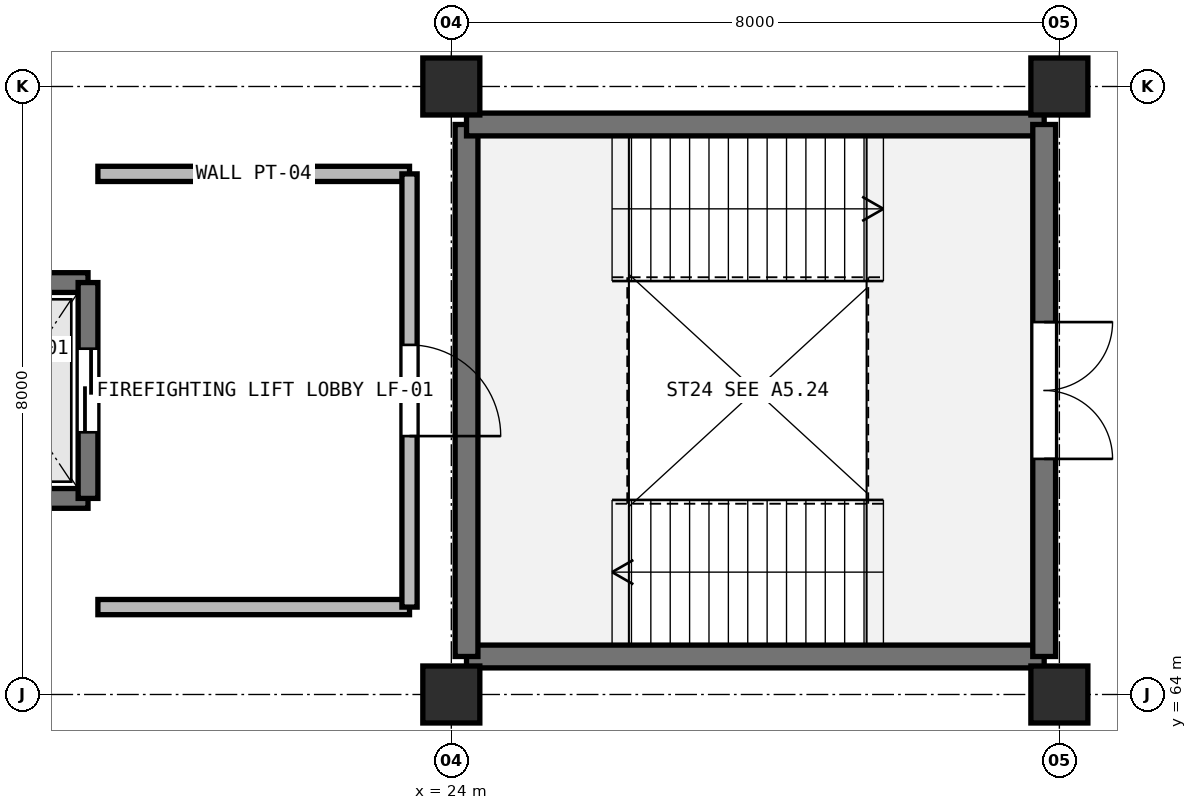
"""IFC4 building model, lengths in metres.
Left out: names, types, materials, properties, quantities, classifications, styles, units other than length and angle.
Written with IfcOpenShell. Run it as: python <this file> out.ifc"""

import sys

from ifc_helpers import new_model, si_unit, direction, frame, frame_2d, origin, origin_2d, place, context, subcontext, project, spatial, rectangle, extrude, element, fill, save


model = new_model("IFC4")
c1 = context("Model", 3, precision=1e-05, world=origin(), true_north=direction((0.0, 1.0)))
c2 = subcontext(c1, "Body", "Model", "MODEL_VIEW")
j1 = project(units=[si_unit("LENGTHUNIT", "METRE"), si_unit("PLANEANGLEUNIT", "RADIAN")], contexts=[c1])
p1 = place(None, origin())
s1 = spatial("IfcSite", under=j1, at=p1, CompositionType="ELEMENT")
p2 = place(p1, origin())
s2 = spatial("IfcBuilding", under=s1, at=p2, CompositionType="ELEMENT")
p3 = place(p2, origin())
s3 = spatial("IfcBuildingStorey", under=s2, at=p3, CompositionType="ELEMENT", Elevation=0.0)
for number, where, z_axis, x_axis in (
    (1, (24.0, 64.0, 0.0), (0.0, 0.0, 1.0), (1.0, 0.0, 0.0)),
    (2, (24.0, 72.0, 0.0), (0.0, 0.0, 1.0), (1.0, 0.0, 0.0)),
    (3, (32.0, 64.0, 0.0), (0.0, 0.0, 1.0), (1.0, 0.0, 0.0)),
    (4, (32.0, 72.0, 0.0), (0.0, 0.0, 1.0), (1.0, 0.0, 0.0)),
):
    element("IfcColumn", number, at=place(p3, frame(where, z_axis=z_axis, x_axis=x_axis)), inside=s3, PredefinedType="COLUMN", context=c2, shape_type="SweptSolid", body=[
        extrude(rectangle(XDim=0.75, YDim=0.75, at=origin_2d()), origin(), (0.0, 0.0, 1.0), 5.4),
    ])
p4 = place(p3, frame((31.8, 64.5, 0.0), z_axis=(0.0, 0.0, 1.0), x_axis=(-1.0, 0.0, 0.0)))
e5 = element("IfcWall", 5, at=p4, inside=s3, PredefinedType="SHEAR", context=c2, shape_type="SweptSolid", body=[
    extrude(rectangle(XDim=7.6, YDim=0.3, at=frame_2d((3.8, 0.0))), origin(), (0.0, 0.0, 1.0), 5.08),
])
p5 = place(p3, frame((24.2, 64.5, 0.0), z_axis=(0.0, 0.0, 1.0), x_axis=(0.0, 1.0, 0.0)))
e6 = element("IfcWall", 6, at=p5, inside=s3, PredefinedType="SHEAR", context=c2, shape_type="SweptSolid", body=[
    extrude(rectangle(XDim=7.0, YDim=0.3, at=frame_2d((3.5, 0.0))), origin(), (0.0, 0.0, 1.0), 5.08),
])
p6 = place(p3, frame((24.2, 71.5, 0.0), z_axis=(0.0, 0.0, 1.0), x_axis=(1.0, 0.0, 0.0)))
e7 = element("IfcWall", 7, at=p6, inside=s3, PredefinedType="SHEAR", context=c2, shape_type="SweptSolid", body=[
    extrude(rectangle(XDim=7.6, YDim=0.3, at=frame_2d((3.8, 0.0))), origin(), (0.0, 0.0, 1.0), 5.08),
])
p7 = place(p3, frame((31.8, 71.5, 0.0), z_axis=(0.0, 0.0, 1.0), x_axis=(0.0, -1.0, 0.0)))
e8 = element("IfcWall", 8, at=p7, inside=s3, PredefinedType="SHEAR", context=c2, shape_type="SweptSolid", body=[
    extrude(rectangle(XDim=7.0, YDim=0.3, at=frame_2d((3.5, 0.0))), origin(), (0.0, 0.0, 1.0), 5.08),
])
p8 = place(p7, frame((2.6, 0.0, 0.0)))
e9 = element("IfcOpeningElement", 9, at=p8, cuts=e8, PredefinedType="OPENING", context=c2, shape_type="SweptSolid", body=[
    extrude(rectangle(XDim=1.8, YDim=2.2, at=frame_2d((0.9, 1.1))), frame((0.0, 0.16, 0.0), z_axis=(0.0, -1.0, 0.0), x_axis=(1.0, 0.0, 0.0)), (0.0, 0.0, 1.0), 0.32),
])
for number, where, z_axis, x_axis in (
    (10, (17.18, 69.42, 0.0), (0.0, 0.0, 1.0), (1.0, 0.0, 0.0)),
    (11, (19.22, 66.58, 0.0), (0.0, 0.0, 1.0), (-1.0, 0.0, 0.0)),
):
    element("IfcWall", number, at=place(p3, frame(where, z_axis=z_axis, x_axis=x_axis)), inside=s3, PredefinedType="SHEAR", context=c2, shape_type="SweptSolid", body=[
        extrude(rectangle(XDim=2.04, YDim=0.26, at=frame_2d((1.02, 0.0))), origin(), (0.0, 0.0, 1.0), 5.08),
    ])
p9 = place(p3, frame((19.22, 69.42, 0.0), z_axis=(0.0, 0.0, 1.0), x_axis=(0.0, -1.0, 0.0)))
e12 = element("IfcWall", 12, at=p9, inside=s3, PredefinedType="SHEAR", context=c2, shape_type="SweptSolid", body=[
    extrude(rectangle(XDim=2.84, YDim=0.26, at=frame_2d((1.42, 0.0))), origin(), (0.0, 0.0, 1.0), 5.08),
])
p10 = place(p9, frame((0.87, 0.0, 0.0)))
e13 = element("IfcOpeningElement", 13, at=p10, cuts=e12, PredefinedType="OPENING", context=c2, shape_type="SweptSolid", body=[
    extrude(rectangle(XDim=1.1, YDim=2.15, at=frame_2d((0.55, 1.075))), frame((0.0, 0.14, 0.0), z_axis=(0.0, -1.0, 0.0), x_axis=(1.0, 0.0, 0.0)), (0.0, 0.0, 1.0), 0.28),
])
for number, where, z_axis, x_axis in (
    (14, (19.35, 70.85, 0.0), (0.0, 0.0, 1.0), (1.0, 0.0, 0.0)),
    (15, (23.45, 65.15, 0.0), (0.0, 0.0, 1.0), (-1.0, 0.0, 0.0)),
):
    element("IfcWall", number, at=place(p3, frame(where, z_axis=z_axis, x_axis=x_axis)), inside=s3, PredefinedType="PARTITIONING", context=c2, shape_type="SweptSolid", body=[
        extrude(rectangle(XDim=4.1, YDim=0.2, at=frame_2d((2.05, 0.0))), origin(), (0.0, 0.0, 1.0), 5.08),
    ])
p11 = place(p3, frame((23.45, 70.85, 0.0), z_axis=(0.0, 0.0, 1.0), x_axis=(0.0, -1.0, 0.0)))
e16 = element("IfcWall", 16, at=p11, inside=s3, PredefinedType="PARTITIONING", context=c2, shape_type="SweptSolid", body=[
    extrude(rectangle(XDim=5.7, YDim=0.2, at=frame_2d((2.85, 0.0))), origin(), (0.0, 0.0, 1.0), 4.05),
])
p12 = place(p11, frame((2.25, 0.0, 0.0)))
e17 = element("IfcOpeningElement", 17, at=p12, cuts=e16, PredefinedType="OPENING", context=c2, shape_type="SweptSolid", body=[
    extrude(rectangle(XDim=1.2, YDim=2.2, at=frame_2d((0.6, 1.1))), frame((0.0, 0.11, 0.0), z_axis=(0.0, -1.0, 0.0), x_axis=(1.0, 0.0, 0.0)), (0.0, 0.0, 1.0), 0.22),
])
p13 = place(p8, origin())
e18 = element("IfcDoor", 18, at=p13, inside=s3, OperationType="DOUBLE_DOOR_SINGLE_SWING", PredefinedType="DOOR", context=c2, shape_type="SweptSolid", body=[
    extrude(rectangle(XDim=1.8, YDim=2.2, at=frame_2d((0.9, 1.1))), frame((0.0, 0.025, 0.0), z_axis=(0.0, -1.0, 0.0), x_axis=(1.0, 0.0, 0.0)), (0.0, 0.0, 1.0), 0.05),
])
fill(e9, e18)
p14 = place(p10, origin())
e19 = element("IfcDoor", 19, at=p14, inside=s3, OperationType="SLIDING_TO_LEFT", PredefinedType="DOOR", context=c2, shape_type="SweptSolid", body=[
    extrude(rectangle(XDim=1.1, YDim=2.15, at=frame_2d((0.55, 1.075))), frame((0.0, 0.025, 0.0), z_axis=(0.0, -1.0, 0.0), x_axis=(1.0, 0.0, 0.0)), (0.0, 0.0, 1.0), 0.05),
])
fill(e13, e19)
p15 = place(p12, origin())
e20 = element("IfcDoor", 20, at=p15, inside=s3, OperationType="SINGLE_SWING_RIGHT", PredefinedType="DOOR", context=c2, shape_type="SweptSolid", body=[
    extrude(rectangle(XDim=1.2, YDim=2.2, at=frame_2d((0.6, 1.1))), frame((0.0, 0.025, 0.0), z_axis=(0.0, -1.0, 0.0), x_axis=(1.0, 0.0, 0.0)), (0.0, 0.0, 1.0), 0.05),
])
fill(e17, e20)
save(model, sys.argv[1])
